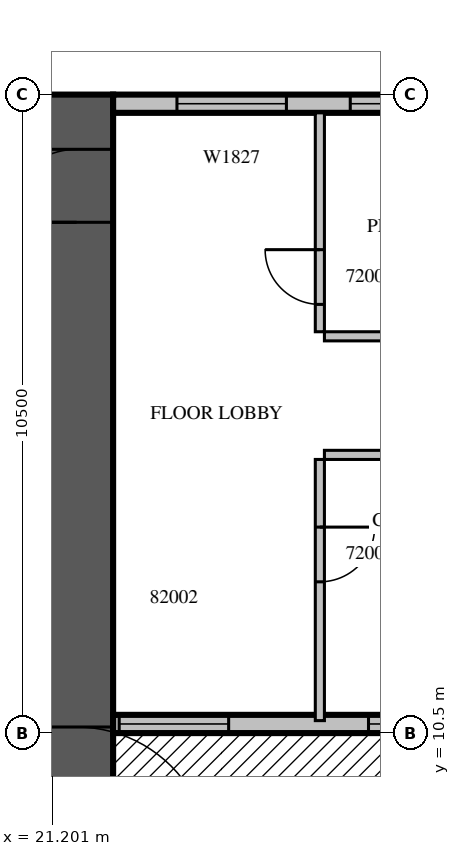
"""IFC4 building model, lengths in metres.
Left out: names, types, materials, properties, quantities, classifications, styles, units other than length and angle.
Written with IfcOpenShell. Run it as: python <this file> out.ifc"""

import sys

from ifc_helpers import new_model, si_unit, direction, frame, frame_2d, origin, place, context, subcontext, project, spatial, rectangle, extrude, source, transform, mapped, element, fill, save


model = new_model("IFC4")
c1 = context("Model", 3, precision=1e-05, world=origin(), true_north=direction((0.0, 1.0)))
c2 = subcontext(c1, "Body", "Model", "MODEL_VIEW")
j1 = project(units=[si_unit("LENGTHUNIT", "METRE"), si_unit("PLANEANGLEUNIT", "RADIAN")], contexts=[c1])
p1 = place(None, origin())
s1 = spatial("IfcSite", under=j1, at=p1, CompositionType="ELEMENT")
p2 = place(p1, origin())
s2 = spatial("IfcBuilding", under=s1, at=p2, CompositionType="ELEMENT")
p3 = place(p2, frame((0.0, 0.0, 95.1)))
s3 = spatial("IfcBuildingStorey", under=s2, at=p3, CompositionType="ELEMENT", Elevation=95.1)
m1 = source(origin(), c2, "Body", "SweptSolid", [
    extrude(rectangle(XDim=16.8, YDim=1.2, at=frame_2d((8.4, 0.0))), origin(), (0.0, 0.0, 1.0), 4.2),
])
p4 = place(p3, frame((21.6, 4.2, 0.0), z_axis=(0.0, 0.0, 1.0), x_axis=(0.0, 1.0, 0.0)))
e1 = element("IfcWall", 1, at=p4, inside=s3, PredefinedType="SHEAR", context=c2, shape_type="MappedRepresentation", body=[
    mapped(m1, transform((0.0, 0.0, 0.0), scale=1.0)),
])
m2 = source(origin(), c2, "Body", "SweptSolid", [
    extrude(rectangle(XDim=2.2, YDim=2.1, at=frame_2d((1.1, 1.05))), frame((0.0, 0.61, 0.0), z_axis=(0.0, -1.0, 0.0), x_axis=(1.0, 0.0, 0.0)), (0.0, 0.0, 1.0), 1.22),
])
p5 = place(p4, frame((4.2, 0.0, 0.0)))
e2 = element("IfcOpeningElement", 2, at=p5, cuts=e1, PredefinedType="OPENING", context=c2, shape_type="MappedRepresentation", body=[
    mapped(m2, transform((0.0, 0.0, 0.0), scale=1.0)),
])
m3 = source(origin(), c2, "Body", "SweptSolid", [
    extrude(rectangle(XDim=1.2, YDim=2.1, at=frame_2d((0.6, 1.05))), frame((0.0, 0.61, 0.0), z_axis=(0.0, -1.0, 0.0), x_axis=(1.0, 0.0, 0.0)), (0.0, 0.0, 1.0), 1.22),
])
p6 = place(p4, frame((14.7, 0.0, 0.0)))
e3 = element("IfcOpeningElement", 3, at=p6, cuts=e1, PredefinedType="OPENING", context=c2, shape_type="MappedRepresentation", body=[
    mapped(m3, transform((0.0, 0.0, 0.0), scale=1.0)),
])
m4 = source(origin(), c2, "Body", "SweptSolid", [
    extrude(rectangle(XDim=6.6, YDim=0.3, at=frame_2d((3.3, 0.0))), origin(), (0.0, 0.0, 1.0), 3.8),
])
p7 = place(p3, frame((22.2, 10.65, 0.0), z_axis=(0.0, 0.0, 1.0), x_axis=(1.0, 0.0, 0.0)))
e4 = element("IfcWall", 4, at=p7, inside=s3, PredefinedType="STANDARD", context=c2, shape_type="MappedRepresentation", body=[
    mapped(m4, transform((0.0, 0.0, 0.0), scale=1.0)),
])
m5 = source(origin(), c2, "Body", "SweptSolid", [
    extrude(rectangle(XDim=1.8, YDim=2.4, at=frame_2d((0.9, 1.2))), frame((0.0, 0.16, 0.0), z_axis=(0.0, -1.0, 0.0), x_axis=(1.0, 0.0, 0.0)), (0.0, 0.0, 1.0), 0.32),
])
p8 = place(p7, frame((0.1, 0.0, 0.0)))
e5 = element("IfcOpeningElement", 5, at=p8, cuts=e4, PredefinedType="OPENING", context=c2, shape_type="MappedRepresentation", body=[
    mapped(m5, transform((0.0, 0.0, 0.0), scale=1.0)),
])
p9 = place(p7, frame((4.2, 0.0, 0.0)))
e6 = element("IfcOpeningElement", 6, at=p9, cuts=e4, PredefinedType="OPENING", context=c2, shape_type="MappedRepresentation", body=[
    mapped(m5, transform((0.0, 0.0, 0.0), scale=1.0)),
])
p10 = place(p3, frame((28.8, 20.85, 0.0), z_axis=(0.0, 0.0, 1.0), x_axis=(-1.0, 0.0, 0.0)))
e7 = element("IfcWall", 7, at=p10, inside=s3, PredefinedType="STANDARD", context=c2, shape_type="MappedRepresentation", body=[
    mapped(m4, transform((0.0, 0.0, 0.0), scale=1.0)),
])
m6 = source(origin(), c2, "Body", "SweptSolid", [
    extrude(rectangle(XDim=2.4, YDim=2.7, at=frame_2d((1.2, 1.35))), frame((0.0, 0.16, 0.0), z_axis=(0.0, -1.0, 0.0), x_axis=(1.0, 0.0, 0.0)), (0.0, 0.0, 1.0), 0.32),
])
p11 = place(p10, frame((0.3, 0.0, 0.6)))
e8 = element("IfcOpeningElement", 8, at=p11, cuts=e7, PredefinedType="OPENING", context=c2, shape_type="MappedRepresentation", body=[
    mapped(m6, transform((0.0, 0.0, 0.0), scale=1.0)),
])
m7 = source(origin(), c2, "Body", "SweptSolid", [
    extrude(rectangle(XDim=1.8, YDim=2.7, at=frame_2d((0.9, 1.35))), frame((0.0, 0.16, 0.0), z_axis=(0.0, -1.0, 0.0), x_axis=(1.0, 0.0, 0.0)), (0.0, 0.0, 1.0), 0.32),
])
p12 = place(p10, frame((3.75, 0.0, 0.6)))
e9 = element("IfcOpeningElement", 9, at=p12, cuts=e7, PredefinedType="OPENING", context=c2, shape_type="MappedRepresentation", body=[
    mapped(m7, transform((0.0, 0.0, 0.0), scale=1.0)),
])
m8 = source(origin(), c2, "Body", "SweptSolid", [
    extrude(rectangle(XDim=4.295, YDim=0.15, at=frame_2d((2.147, 0.0))), origin(), (0.0, 0.0, 1.0), 3.8),
])
p13 = place(p3, frame((25.6, 15.0, 0.0), z_axis=(0.0, 0.0, 1.0), x_axis=(0.0, -1.0, 0.0)))
e10 = element("IfcWall", 10, at=p13, inside=s3, PredefinedType="PARTITIONING", context=c2, shape_type="MappedRepresentation", body=[
    mapped(m8, transform((0.0, 0.0, 0.0), scale=1.0)),
])
m9 = source(origin(), c2, "Body", "SweptSolid", [
    extrude(rectangle(XDim=0.9, YDim=2.1, at=frame_2d((0.45, 1.05))), frame((0.0, 0.085, 0.0), z_axis=(0.0, -1.0, 0.0), x_axis=(1.0, 0.0, 0.0)), (0.0, 0.0, 1.0), 0.17),
])
p14 = place(p13, frame((1.113, 0.0, 0.0)))
e11 = element("IfcOpeningElement", 11, at=p14, cuts=e10, PredefinedType="OPENING", context=c2, shape_type="MappedRepresentation", body=[
    mapped(m9, transform((0.0, 0.0, 0.0), scale=1.0)),
])
m10 = source(origin(), c2, "Body", "SweptSolid", [
    extrude(rectangle(XDim=3.6, YDim=0.15, at=frame_2d((1.8, 0.0))), origin(), (0.0, 0.0, 1.0), 3.8),
])
p15 = place(p3, frame((25.6, 20.7, 0.0), z_axis=(0.0, 0.0, 1.0), x_axis=(0.0, -1.0, 0.0)))
e12 = element("IfcWall", 12, at=p15, inside=s3, PredefinedType="PARTITIONING", context=c2, shape_type="MappedRepresentation", body=[
    mapped(m10, transform((0.0, 0.0, 0.0), scale=1.0)),
])
p16 = place(p15, frame((2.25, 0.0, 0.0)))
e13 = element("IfcOpeningElement", 13, at=p16, cuts=e12, PredefinedType="OPENING", context=c2, shape_type="MappedRepresentation", body=[
    mapped(m9, transform((0.0, 0.0, 0.0), scale=1.0)),
])
m11 = source(origin(), c2, "Body", "SweptSolid", [
    extrude(rectangle(XDim=3.65, YDim=0.15, at=frame_2d((1.825, 0.0))), origin(), (0.0, 0.0, 1.0), 3.8),
])
for number, where, z_axis, x_axis in (
    (14, (29.325, 15.075, 0.0), (0.0, 0.0, 1.0), (-1.0, 0.0, 0.0)),
    (15, (25.675, 17.025, 0.0), (0.0, 0.0, 1.0), (1.0, 0.0, 0.0)),
):
    element("IfcWall", number, at=place(p3, frame(where, z_axis=z_axis, x_axis=x_axis)), inside=s3, PredefinedType="PARTITIONING", context=c2, shape_type="MappedRepresentation", body=[
        mapped(m11, transform((0.0, 0.0, 0.0), scale=1.0)),
    ])
m12 = source(origin(), c2, "Body", "SweptSolid", [
    extrude(rectangle(XDim=1.8, YDim=2.4, at=frame_2d((0.9, 1.2))), frame((0.0, 0.025, 0.0), z_axis=(0.0, -1.0, 0.0), x_axis=(1.0, 0.0, 0.0)), (0.0, 0.0, 1.0), 0.05),
])
p17 = place(p8, origin())
e16 = element("IfcDoor", 16, at=p17, inside=s3, OperationType="SLIDING_TO_LEFT", PredefinedType="DOOR", context=c2, shape_type="MappedRepresentation", body=[
    mapped(m12, transform((0.0, 0.0, 0.0), scale=1.0)),
])
fill(e5, e16)
p18 = place(p9, origin())
e17 = element("IfcDoor", 17, at=p18, inside=s3, OperationType="SLIDING_TO_LEFT", PredefinedType="DOOR", context=c2, shape_type="MappedRepresentation", body=[
    mapped(m12, transform((0.0, 0.0, 0.0), scale=1.0)),
])
fill(e6, e17)
m13 = source(origin(), c2, "Body", "SweptSolid", [
    extrude(rectangle(XDim=2.4, YDim=2.7, at=frame_2d((1.2, 1.35))), frame((0.0, 0.03, 0.0), z_axis=(0.0, -1.0, 0.0), x_axis=(1.0, 0.0, 0.0)), (0.0, 0.0, 1.0), 0.06),
])
p19 = place(p11, origin())
e18 = element("IfcWindow", 18, at=p19, inside=s3, PartitioningType="SINGLE_PANEL", PredefinedType="WINDOW", context=c2, shape_type="MappedRepresentation", body=[
    mapped(m13, transform((0.0, 0.0, 0.0), scale=1.0)),
])
fill(e8, e18)
m14 = source(origin(), c2, "Body", "SweptSolid", [
    extrude(rectangle(XDim=1.8, YDim=2.7, at=frame_2d((0.9, 1.35))), frame((0.0, 0.03, 0.0), z_axis=(0.0, -1.0, 0.0), x_axis=(1.0, 0.0, 0.0)), (0.0, 0.0, 1.0), 0.06),
])
p20 = place(p12, origin())
e19 = element("IfcWindow", 19, at=p20, inside=s3, PartitioningType="SINGLE_PANEL", PredefinedType="WINDOW", context=c2, shape_type="MappedRepresentation", body=[
    mapped(m14, transform((0.0, 0.0, 0.0), scale=1.0)),
])
fill(e9, e19)
m15 = source(origin(), c2, "Body", "SweptSolid", [
    extrude(rectangle(XDim=2.2, YDim=2.1, at=frame_2d((1.1, 1.05))), frame((0.0, 0.025, 0.0), z_axis=(0.0, -1.0, 0.0), x_axis=(1.0, 0.0, 0.0)), (0.0, 0.0, 1.0), 0.05),
])
p21 = place(p5, origin())
e20 = element("IfcDoor", 20, at=p21, inside=s3, OperationType="DOUBLE_DOOR_SINGLE_SWING", PredefinedType="DOOR", context=c2, shape_type="MappedRepresentation", body=[
    mapped(m15, transform((0.0, 0.0, 0.0), scale=1.0)),
])
fill(e2, e20)
m16 = source(origin(), c2, "Body", "SweptSolid", [
    extrude(rectangle(XDim=1.2, YDim=2.1, at=frame_2d((0.6, 1.05))), frame((0.0, 0.025, 0.0), z_axis=(0.0, -1.0, 0.0), x_axis=(1.0, 0.0, 0.0)), (0.0, 0.0, 1.0), 0.05),
])
p22 = place(p6, origin())
e21 = element("IfcDoor", 21, at=p22, inside=s3, OperationType="SINGLE_SWING_LEFT", PredefinedType="DOOR", context=c2, shape_type="MappedRepresentation", body=[
    mapped(m16, transform((0.0, 0.0, 0.0), scale=1.0)),
])
fill(e3, e21)
m17 = source(origin(), c2, "Body", "SweptSolid", [
    extrude(rectangle(XDim=0.9, YDim=2.1, at=frame_2d((0.45, 1.05))), frame((0.0, 0.025, 0.0), z_axis=(0.0, -1.0, 0.0), x_axis=(1.0, 0.0, 0.0)), (0.0, 0.0, 1.0), 0.05),
])
p23 = place(p14, origin())
e22 = element("IfcDoor", 22, at=p23, inside=s3, OperationType="SINGLE_SWING_LEFT", PredefinedType="DOOR", context=c2, shape_type="MappedRepresentation", body=[
    mapped(m17, transform((0.0, 0.0, 0.0), scale=1.0)),
])
fill(e11, e22)
p24 = place(p16, origin())
e23 = element("IfcDoor", 23, at=p24, inside=s3, OperationType="SINGLE_SWING_RIGHT", PredefinedType="DOOR", context=c2, shape_type="MappedRepresentation", body=[
    mapped(m17, transform((0.0, 0.0, 0.0), scale=1.0)),
])
fill(e13, e23)
save(model, sys.argv[1])
